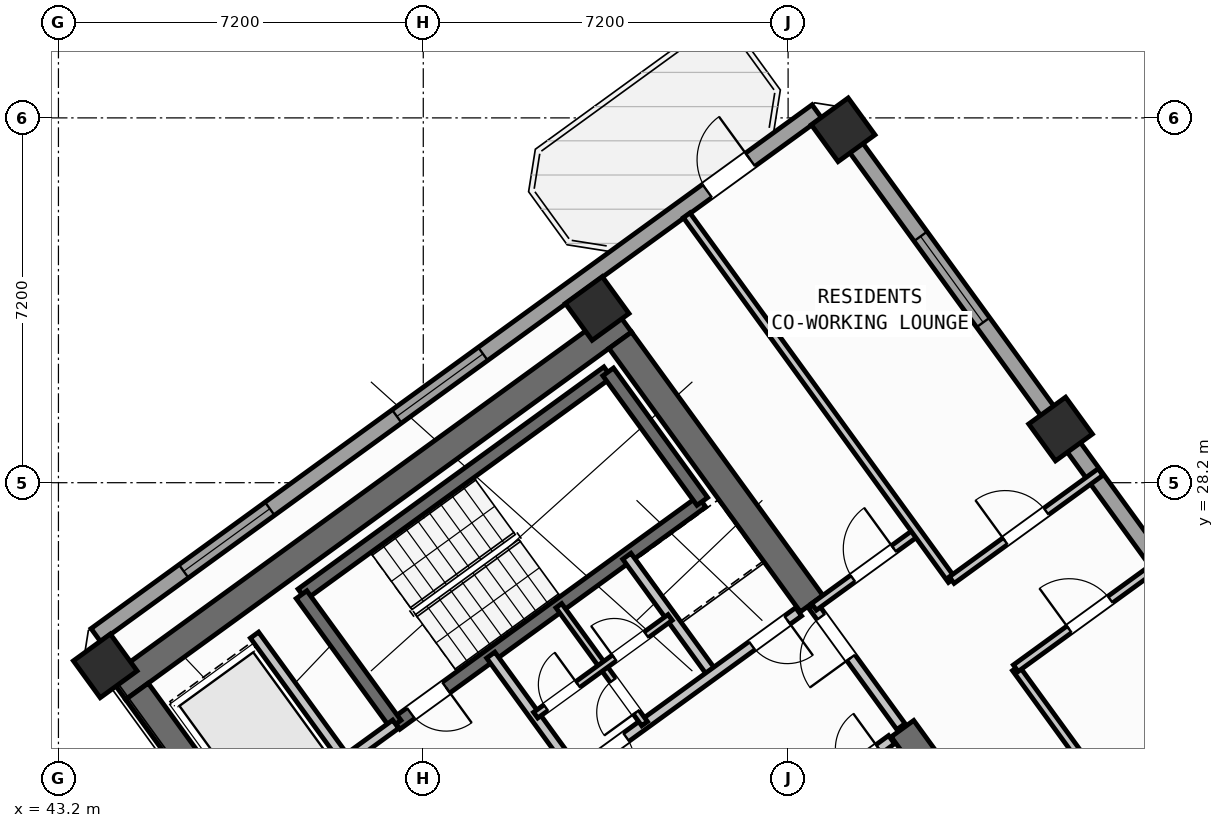
"""IFC4 building model, lengths in metres.
Left out: names, types, materials, properties, quantities, classifications, styles, units other than length and angle.
Written with IfcOpenShell. Run it as: python <this file> out.ifc"""

import sys

from ifc_helpers import new_model, si_unit, direction, frame, frame_2d, origin, origin_2d, place, context, subcontext, project, spatial, rectangle, hollow_rectangle, extrude, source, transform, mapped, element, fill, save


model = new_model("IFC4")
c1 = context("Model", 3, precision=1e-05, world=origin(), true_north=direction((0.0, 1.0)))
c2 = subcontext(c1, "Body", "Model", "MODEL_VIEW")
j1 = project(units=[si_unit("LENGTHUNIT", "METRE"), si_unit("PLANEANGLEUNIT", "RADIAN")], contexts=[c1])
p1 = place(None, origin())
s1 = spatial("IfcSite", under=j1, at=p1, CompositionType="ELEMENT")
p2 = place(p1, origin())
s2 = spatial("IfcBuilding", under=s1, at=p2, CompositionType="ELEMENT")
p3 = place(p2, frame((0.0, 0.0, 140.7)))
s3 = spatial("IfcBuildingStorey", under=s2, at=p3, CompositionType="ELEMENT", Elevation=140.7)
p4 = place(p3, frame((44.365, 24.142, 0.0), z_axis=(0.0, 0.0, 1.0), x_axis=(0.809024304885, 0.587775190107, 0.0)))
e1 = element("IfcWall", 1, at=p4, inside=s3, PredefinedType="SHEAR", context=c2, shape_type="SweptSolid", body=[
    extrude(rectangle(XDim=12.34, YDim=0.55, at=frame_2d((6.17, 0.0))), origin(), (0.0, 0.0, 1.0), 3.35),
])
p5 = place(p3, frame((48.526, 18.884, 0.0), z_axis=(0.0, 0.0, 1.0), x_axis=(-0.587764933797, 0.809031756236, 0.0)))
e2 = element("IfcWall", 2, at=p5, inside=s3, PredefinedType="SHEAR", context=c2, shape_type="SweptSolid", body=[
    extrude(rectangle(XDim=6.425, YDim=0.55, at=frame_2d((3.212, 0.0))), origin(), (0.0, 0.0, 1.0), 3.35),
])
p6 = place(p3, frame((61.958, 20.454, 0.0), z_axis=(0.0, 0.0, 1.0), x_axis=(-0.587802113096, 0.809004744015, 0.0)))
e3 = element("IfcWall", 3, at=p6, inside=s3, PredefinedType="SHEAR", context=c2, shape_type="SweptSolid", body=[
    extrude(rectangle(XDim=3.575, YDim=0.55, at=frame_2d((1.788, 0.0))), origin(), (0.0, 0.0, 1.0), 3.35),
])
p7 = place(p3, frame((58.064, 25.813, 0.0), z_axis=(0.0, 0.0, 1.0), x_axis=(-0.587764933797, 0.809031756236, 0.0)))
e4 = element("IfcWall", 4, at=p7, inside=s3, PredefinedType="SHEAR", context=c2, shape_type="SweptSolid", body=[
    extrude(rectangle(XDim=6.425, YDim=0.55, at=frame_2d((3.212, 0.0))), origin(), (0.0, 0.0, 1.0), 3.35),
])
m1 = source(origin(), c2, "Body", "SweptSolid", [
    extrude(hollow_rectangle(XDim=0.9, YDim=0.9, WallThickness=0.036, at=origin_2d()), origin(), (0.0, 0.0, 1.0), 3.6),
])
for number, where, z_axis, x_axis in (
    (5, (44.124, 24.585, 0.0), (0.0, 0.0, 1.0), (0.809, 0.588, 0.0)),
    (6, (53.832, 31.638, 0.0), (0.0, 0.0, 1.0), (0.809, 0.588, 0.0)),
    (7, (62.977, 29.259, 0.0), (0.0, 0.0, 1.0), (0.809, 0.588, 0.0)),
    (8, (58.686, 35.165, 0.0), (0.0, 0.0, 1.0), (0.809, 0.588, 0.0)),
):
    element("IfcColumn", number, at=place(p3, frame(where, z_axis=z_axis, x_axis=x_axis)), inside=s3, PredefinedType="COLUMN", context=c2, shape_type="MappedRepresentation", body=[
        mapped(m1, transform((0.0, 0.0, 0.0), scale=1.0)),
    ])
p8 = place(p3, frame((43.938, 25.192, 0.0), z_axis=(0.0, 0.0, 1.0), x_axis=(0.809016324578, 0.587786174187, 0.0)))
e9 = element("IfcWall", 9, at=p8, inside=s3, PredefinedType="STANDARD", context=c2, shape_type="SweptSolid", body=[
    extrude(rectangle(XDim=17.587, YDim=0.32, at=frame_2d((8.794, 0.0))), origin(), (0.0, 0.0, 1.0), 3.35),
])
p9 = place(p8, frame((14.914, 0.0, 0.0)))
e10 = element("IfcOpeningElement", 10, at=p9, cuts=e9, PredefinedType="OPENING", context=c2, shape_type="SweptSolid", body=[
    extrude(rectangle(XDim=1.05, YDim=2.15, at=frame_2d((0.525, 1.075))), frame((0.0, 0.17, 0.0), z_axis=(0.0, -1.0, 0.0), x_axis=(1.0, 0.0, 0.0)), (0.0, 0.0, 1.0), 0.34),
])
p10 = place(p8, frame((2.144, 0.0, 0.8)))
e11 = element("IfcOpeningElement", 11, at=p10, cuts=e9, PredefinedType="OPENING", context=c2, shape_type="SweptSolid", body=[
    extrude(rectangle(XDim=2.1, YDim=1.55, at=frame_2d((1.05, 0.775))), frame((0.0, 0.17, 0.0), z_axis=(0.0, -1.0, 0.0), x_axis=(1.0, 0.0, 0.0)), (0.0, 0.0, 1.0), 0.34),
])
p11 = place(p8, frame((7.344, 0.0, 0.8)))
e12 = element("IfcOpeningElement", 12, at=p11, cuts=e9, PredefinedType="OPENING", context=c2, shape_type="SweptSolid", body=[
    extrude(rectangle(XDim=2.1, YDim=1.55, at=frame_2d((1.05, 0.775))), frame((0.0, 0.17, 0.0), z_axis=(0.0, -1.0, 0.0), x_axis=(1.0, 0.0, 0.0)), (0.0, 0.0, 1.0), 0.34),
])
p12 = place(p3, frame((58.455, 35.484, 0.0), z_axis=(0.0, 0.0, 1.0), x_axis=(0.587783625747, -0.809018176127, 0.0)))
e13 = element("IfcWall", 13, at=p12, inside=s3, PredefinedType="STANDARD", context=c2, shape_type="SweptSolid", body=[
    extrude(rectangle(XDim=21.587, YDim=0.32, at=frame_2d((10.794, 0.0))), origin(), (0.0, 0.0, 1.0), 2.775),
])
p13 = place(p12, frame((2.994, 0.0, 0.8)))
e14 = element("IfcOpeningElement", 14, at=p13, cuts=e13, PredefinedType="OPENING", context=c2, shape_type="SweptSolid", body=[
    extrude(rectangle(XDim=2.1, YDim=1.55, at=frame_2d((1.05, 0.775))), frame((0.0, 0.17, 0.0), z_axis=(0.0, -1.0, 0.0), x_axis=(1.0, 0.0, 0.0)), (0.0, 0.0, 1.0), 0.34),
])
p14 = place(p12, frame((11.959, 0.0, 0.85)))
e15 = element("IfcOpeningElement", 15, at=p14, cuts=e13, PredefinedType="OPENING", context=c2, shape_type="SweptSolid", body=[
    extrude(rectangle(XDim=1.8, YDim=1.5, at=frame_2d((0.9, 0.75))), frame((0.0, 0.17, 0.0), z_axis=(0.0, -1.0, 0.0), x_axis=(1.0, 0.0, 0.0)), (0.0, 0.0, 1.0), 0.34),
])
p15 = place(p12, frame((18.56, 0.0, 0.85)))
e16 = element("IfcOpeningElement", 16, at=p15, cuts=e13, PredefinedType="OPENING", context=c2, shape_type="SweptSolid", body=[
    extrude(rectangle(XDim=1.5, YDim=1.5, at=frame_2d((0.75, 0.75))), frame((0.0, 0.17, 0.0), z_axis=(0.0, -1.0, 0.0), x_axis=(1.0, 0.0, 0.0)), (0.0, 0.0, 1.0), 0.34),
])
p16 = place(p3, frame((48.006, 25.996, 0.0), z_axis=(0.0, 0.0, 1.0), x_axis=(0.80901903764, 0.587782439969, 0.0)))
e17 = element("IfcWall", 17, at=p16, inside=s3, PredefinedType="SHEAR", context=c2, shape_type="SweptSolid", body=[
    extrude(rectangle(XDim=7.46, YDim=0.26, at=frame_2d((3.73, 0.0))), origin(), (0.0, 0.0, 1.0), 3.35),
])
p17 = place(p3, frame((49.863, 23.44, 0.0), z_axis=(0.0, 0.0, 1.0), x_axis=(0.809003474932, 0.587803859759, 0.0)))
e18 = element("IfcWall", 18, at=p17, inside=s3, PredefinedType="SHEAR", context=c2, shape_type="SweptSolid", body=[
    extrude(rectangle(XDim=7.46, YDim=0.26, at=frame_2d((3.73, 0.0))), origin(), (0.0, 0.0, 1.0), 3.35),
])
p18 = place(p17, frame((0.36, 0.0, 0.0)))
e19 = element("IfcOpeningElement", 19, at=p18, cuts=e18, PredefinedType="OPENING", context=c2, shape_type="SweptSolid", body=[
    extrude(rectangle(XDim=0.86, YDim=2.05, at=frame_2d((0.43, 1.025))), frame((0.0, 0.14, 0.0), z_axis=(0.0, -1.0, 0.0), x_axis=(1.0, 0.0, 0.0)), (0.0, 0.0, 1.0), 0.28),
])
p19 = place(p3, frame((49.855, 23.434, 0.0), z_axis=(0.0, 0.0, 1.0), x_axis=(-0.58776738483, 0.809029975545, 0.0)))
e20 = element("IfcWall", 20, at=p19, inside=s3, PredefinedType="SHEAR", context=c2, shape_type="SweptSolid", body=[
    extrude(rectangle(XDim=3.16, YDim=0.26, at=frame_2d((1.58, 0.0))), origin(), (0.0, 0.0, 1.0), 3.35),
])
p20 = place(p3, frame((55.906, 27.831, 0.0), z_axis=(0.0, 0.0, 1.0), x_axis=(-0.587804123638, 0.809003283204, 0.0)))
e21 = element("IfcWall", 21, at=p20, inside=s3, PredefinedType="SHEAR", context=c2, shape_type="SweptSolid", body=[
    extrude(rectangle(XDim=3.16, YDim=0.26, at=frame_2d((1.58, 0.0))), origin(), (0.0, 0.0, 1.0), 3.35),
])
p21 = place(p3, frame((47.065, 21.407, 0.0), z_axis=(0.0, 0.0, 1.0), x_axis=(0.809032984992, 0.587763242466, 0.0)))
e22 = element("IfcWall", 22, at=p21, inside=s3, PredefinedType="STANDARD", context=c2, shape_type="SweptSolid", body=[
    extrude(rectangle(XDim=3.448, YDim=0.2, at=frame_2d((1.724, 0.0))), origin(), (0.0, 0.0, 1.0), 3.34),
])
p22 = place(p21, frame((0.458, 0.0, 0.0)))
e23 = element("IfcOpeningElement", 23, at=p22, cuts=e22, PredefinedType="OPENING", context=c2, shape_type="SweptSolid", body=[
    extrude(rectangle(XDim=1.3, YDim=2.2, at=frame_2d((0.65, 1.1))), frame((0.0, 0.11, 0.0), z_axis=(0.0, -1.0, 0.0), x_axis=(1.0, 0.0, 0.0)), (0.0, 0.0, 1.0), 0.22),
])
p23 = place(p3, frame((56.553, 20.884, 0.0), z_axis=(0.0, 0.0, 1.0), x_axis=(0.809023564264, 0.58777620951, 0.0)))
e24 = element("IfcWall", 24, at=p23, inside=s3, PredefinedType="STANDARD", context=c2, shape_type="SweptSolid", body=[
    extrude(rectangle(XDim=3.818, YDim=0.2, at=frame_2d((1.909, 0.0))), origin(), (0.0, 0.0, 1.0), 3.34),
])
p24 = place(p23, frame((0.57, 0.0, 0.0)))
e25 = element("IfcOpeningElement", 25, at=p24, cuts=e24, PredefinedType="OPENING", context=c2, shape_type="SweptSolid", body=[
    extrude(rectangle(XDim=1.1, YDim=2.15, at=frame_2d((0.55, 1.075))), frame((0.0, 0.11, 0.0), z_axis=(0.0, -1.0, 0.0), x_axis=(1.0, 0.0, 0.0)), (0.0, 0.0, 1.0), 0.22),
])
p25 = place(p23, frame((2.65, 0.0, 0.0)))
e26 = element("IfcOpeningElement", 26, at=p25, cuts=e24, PredefinedType="OPENING", context=c2, shape_type="SweptSolid", body=[
    extrude(rectangle(XDim=0.86, YDim=2.05, at=frame_2d((0.43, 1.025))), frame((0.0, 0.11, 0.0), z_axis=(0.0, -1.0, 0.0), x_axis=(1.0, 0.0, 0.0)), (0.0, 0.0, 1.0), 0.22),
])
p26 = place(p3, frame((48.786, 22.83, 0.0), z_axis=(0.0, 0.0, 1.0), x_axis=(-0.587783856777, 0.809018008275, 0.0)))
e27 = element("IfcWall", 27, at=p26, inside=s3, PredefinedType="STANDARD", context=c2, shape_type="SweptSolid", body=[
    extrude(rectangle(XDim=2.92, YDim=0.2, at=frame_2d((1.46, 0.0))), origin(), (0.0, 0.0, 1.0), 3.34),
])
p27 = place(p3, frame((53.425, 22.468, 0.0), z_axis=(0.0, 0.0, 1.0), x_axis=(-0.5877230039, 0.809062216821, 0.0)))
e28 = element("IfcWall", 28, at=p27, inside=s3, PredefinedType="STANDARD", context=c2, shape_type="SweptSolid", body=[
    extrude(rectangle(XDim=2.88, YDim=0.2, at=frame_2d((1.44, 0.0))), origin(), (0.0, 0.0, 1.0), 3.34),
])
p28 = place(p3, frame((56.111, 24.419, 0.0), z_axis=(0.0, 0.0, 1.0), x_axis=(-0.58777848983, 0.809021907548, 0.0)))
e29 = element("IfcWall", 29, at=p28, inside=s3, PredefinedType="STANDARD", context=c2, shape_type="SweptSolid", body=[
    extrude(rectangle(XDim=2.88, YDim=0.2, at=frame_2d((1.44, 0.0))), origin(), (0.0, 0.0, 1.0), 3.34),
])
p29 = place(p3, frame((53.425, 22.468, 0.0), z_axis=(0.0, 0.0, 1.0), x_axis=(0.809024377198, 0.587775090574, 0.0)))
e30 = element("IfcWall", 30, at=p29, inside=s3, PredefinedType="STANDARD", context=c2, shape_type="SweptSolid", body=[
    extrude(rectangle(XDim=5.418, YDim=0.2, at=frame_2d((2.709, 0.0))), origin(), (0.0, 0.0, 1.0), 3.34),
])
p30 = place(p29, frame((4.28, 0.0, 0.0)))
e31 = element("IfcOpeningElement", 31, at=p30, cuts=e30, PredefinedType="OPENING", context=c2, shape_type="SweptSolid", body=[
    extrude(rectangle(XDim=0.86, YDim=2.05, at=frame_2d((0.43, 1.025))), frame((0.0, 0.11, 0.0), z_axis=(0.0, -1.0, 0.0), x_axis=(1.0, 0.0, 0.0)), (0.0, 0.0, 1.0), 0.22),
])
p31 = place(p29, frame((0.35, 0.0, 0.0)))
e32 = element("IfcOpeningElement", 32, at=p31, cuts=e30, PredefinedType="OPENING", context=c2, shape_type="SweptSolid", body=[
    extrude(rectangle(XDim=0.86, YDim=2.05, at=frame_2d((0.43, 1.025))), frame((0.0, 0.11, 0.0), z_axis=(0.0, -1.0, 0.0), x_axis=(1.0, 0.0, 0.0)), (0.0, 0.0, 1.0), 0.22),
])
p32 = place(p3, frame((54.768, 23.443, 0.0), z_axis=(0.0, 0.0, 1.0), x_axis=(-0.587736077749, 0.809052719489, 0.0)))
e33 = element("IfcWall", 33, at=p32, inside=s3, PredefinedType="PLUMBINGWALL", context=c2, shape_type="SweptSolid", body=[
    extrude(rectangle(XDim=1.4, YDim=0.14, at=frame_2d((0.7, 0.0))), origin(), (0.0, 0.0, 1.0), 3.34),
])
p33 = place(p32, frame((0.28, 0.0, 0.0)))
e34 = element("IfcOpeningElement", 34, at=p33, cuts=e33, PredefinedType="OPENING", context=c2, shape_type="SweptSolid", body=[
    extrude(rectangle(XDim=0.78, YDim=2.05, at=frame_2d((0.39, 1.025))), frame((0.0, 0.08, 0.0), z_axis=(0.0, -1.0, 0.0), x_axis=(1.0, 0.0, 0.0)), (0.0, 0.0, 1.0), 0.16),
])
p34 = place(p3, frame((53.945, 24.576, 0.0), z_axis=(0.0, 0.0, 1.0), x_axis=(-0.587897037186, 0.808935766095, 0.0)))
e35 = element("IfcWall", 35, at=p34, inside=s3, PredefinedType="PLUMBINGWALL", context=c2, shape_type="SweptSolid", body=[
    extrude(rectangle(XDim=1.48, YDim=0.14, at=frame_2d((0.74, 0.0))), origin(), (0.0, 0.0, 1.0), 3.34),
])
p35 = place(p3, frame((52.618, 23.612, 0.0), z_axis=(0.0, 0.0, 1.0), x_axis=(0.809009587469, 0.587795446889, 0.0)))
e36 = element("IfcWall", 36, at=p35, inside=s3, PredefinedType="PLUMBINGWALL", context=c2, shape_type="SweptSolid", body=[
    extrude(rectangle(XDim=3.28, YDim=0.14, at=frame_2d((1.64, 0.0))), origin(), (0.0, 0.0, 1.0), 3.34),
])
p36 = place(p35, frame((0.25, 0.0, 0.0)))
e37 = element("IfcOpeningElement", 37, at=p36, cuts=e36, PredefinedType="OPENING", context=c2, shape_type="SweptSolid", body=[
    extrude(rectangle(XDim=0.78, YDim=2.05, at=frame_2d((0.39, 1.025))), frame((0.0, 0.08, 0.0), z_axis=(0.0, -1.0, 0.0), x_axis=(1.0, 0.0, 0.0)), (0.0, 0.0, 1.0), 0.16),
])
p37 = place(p35, frame((1.92, 0.0, 0.0)))
e38 = element("IfcOpeningElement", 38, at=p37, cuts=e36, PredefinedType="OPENING", context=c2, shape_type="SweptSolid", body=[
    extrude(rectangle(XDim=0.78, YDim=2.05, at=frame_2d((0.39, 1.025))), frame((0.0, 0.08, 0.0), z_axis=(0.0, -1.0, 0.0), x_axis=(1.0, 0.0, 0.0)), (0.0, 0.0, 1.0), 0.16),
])
p38 = place(p3, frame((59.827, 23.386, 0.0), z_axis=(0.0, 0.0, 1.0), x_axis=(-0.587803840107, 0.809003489211, 0.0)))
e39 = element("IfcWall", 39, at=p38, inside=s3, PredefinedType="STANDARD", context=c2, shape_type="SweptSolid", body=[
    extrude(rectangle(XDim=2.96, YDim=0.2, at=frame_2d((1.48, 0.0))), origin(), (0.0, 0.0, 1.0), 3.34),
])
p39 = place(p38, frame((1.68, 0.0, 0.0)))
e40 = element("IfcOpeningElement", 40, at=p39, cuts=e39, PredefinedType="OPENING", context=c2, shape_type="SweptSolid", body=[
    extrude(rectangle(XDim=1.0, YDim=2.1, at=frame_2d((0.5, 1.05))), frame((0.0, 0.11, 0.0), z_axis=(0.0, -1.0, 0.0), x_axis=(1.0, 0.0, 0.0)), (0.0, 0.0, 1.0), 0.22),
])
p40 = place(p3, frame((58.111, 25.749, 0.0), z_axis=(0.0, 0.0, 1.0), x_axis=(0.809000999347, 0.58780726693, 0.0)))
e41 = element("IfcWall", 41, at=p40, inside=s3, PredefinedType="PARTITIONING", context=c2, shape_type="SweptSolid", body=[
    extrude(rectangle(XDim=2.51, YDim=0.16, at=frame_2d((1.255, 0.0))), origin(), (0.0, 0.0, 1.0), 2.775),
])
p41 = place(p40, frame((0.95, 0.0, 0.0)))
e42 = element("IfcOpeningElement", 42, at=p41, cuts=e41, PredefinedType="OPENING", context=c2, shape_type="SweptSolid", body=[
    extrude(rectangle(XDim=1.0, YDim=2.1, at=frame_2d((0.5, 1.05))), frame((0.0, 0.09, 0.0), z_axis=(0.0, -1.0, 0.0), x_axis=(1.0, 0.0, 0.0)), (0.0, 0.0, 1.0), 0.18),
])
p42 = place(p3, frame((68.353, 15.922, 0.0), z_axis=(0.0, 0.0, 1.0), x_axis=(-0.587783168305, 0.809018508476, 0.0)))
e43 = element("IfcWall", 43, at=p42, inside=s3, PredefinedType="PARTITIONING", context=c2, shape_type="SweptSolid", body=[
    extrude(rectangle(XDim=10.65, YDim=0.16, at=frame_2d((5.325, 0.0))), origin(), (0.0, 0.0, 1.0), 3.34),
])
p43 = place(p3, frame((60.829, 26.278, 0.0), z_axis=(0.0, 0.0, 1.0), x_axis=(-0.587781800813, 0.80901950201, 0.0)))
e44 = element("IfcWall", 44, at=p43, inside=s3, PredefinedType="PARTITIONING", context=c2, shape_type="SweptSolid", body=[
    extrude(rectangle(XDim=8.9, YDim=0.16, at=frame_2d((4.45, 0.0))), origin(), (0.0, 0.0, 1.0), 3.34),
])
p44 = place(p3, frame((62.093, 24.538, 0.0), z_axis=(0.0, 0.0, 1.0), x_axis=(0.809035546126, 0.58775971715, 0.0)))
e45 = element("IfcWall", 45, at=p44, inside=s3, PredefinedType="PARTITIONING", context=c2, shape_type="SweptSolid", body=[
    extrude(rectangle(XDim=3.63, YDim=0.16, at=frame_2d((1.815, 0.0))), origin(), (0.0, 0.0, 1.0), 3.34),
])
p45 = place(p44, frame((1.305, 0.0, 0.0)))
e46 = element("IfcOpeningElement", 46, at=p45, cuts=e45, PredefinedType="OPENING", context=c2, shape_type="SweptSolid", body=[
    extrude(rectangle(XDim=1.0, YDim=2.1, at=frame_2d((0.5, 1.05))), frame((0.0, 0.09, 0.0), z_axis=(0.0, -1.0, 0.0), x_axis=(1.0, 0.0, 0.0)), (0.0, 0.0, 1.0), 0.18),
])
p46 = place(p3, frame((60.829, 26.278, 0.0), z_axis=(0.0, 0.0, 1.0), x_axis=(0.809003564202, 0.587803736896, 0.0)))
e47 = element("IfcWall", 47, at=p46, inside=s3, PredefinedType="PARTITIONING", context=c2, shape_type="SweptSolid", body=[
    extrude(rectangle(XDim=3.63, YDim=0.16, at=frame_2d((1.815, 0.0))), origin(), (0.0, 0.0, 1.0), 3.34),
])
p47 = place(p46, frame((1.305, 0.0, 0.0)))
e48 = element("IfcOpeningElement", 48, at=p47, cuts=e47, PredefinedType="OPENING", context=c2, shape_type="SweptSolid", body=[
    extrude(rectangle(XDim=1.0, YDim=2.1, at=frame_2d((0.5, 1.05))), frame((0.0, 0.09, 0.0), z_axis=(0.0, -1.0, 0.0), x_axis=(1.0, 0.0, 0.0)), (0.0, 0.0, 1.0), 0.18),
])
m2 = source(origin(), c2, "Body", "SweptSolid", [
    extrude(rectangle(XDim=1.05, YDim=2.15, at=frame_2d((0.525, 1.075))), frame((0.0, 0.025, 0.0), z_axis=(0.0, -1.0, 0.0), x_axis=(1.0, 0.0, 0.0)), (0.0, 0.0, 1.0), 0.05),
])
p48 = place(p9, origin())
e49 = element("IfcDoor", 49, at=p48, inside=s3, OperationType="SINGLE_SWING_RIGHT", PredefinedType="DOOR", context=c2, shape_type="MappedRepresentation", body=[
    mapped(m2, transform((0.0, 0.0, 0.0), scale=1.0)),
])
fill(e10, e49)
m3 = source(origin(), c2, "Body", "SweptSolid", [
    extrude(rectangle(XDim=2.1, YDim=1.55, at=frame_2d((1.05, 0.775))), frame((0.0, 0.03, 0.0), z_axis=(0.0, -1.0, 0.0), x_axis=(1.0, 0.0, 0.0)), (0.0, 0.0, 1.0), 0.06),
])
p49 = place(p10, origin())
e50 = element("IfcWindow", 50, at=p49, inside=s3, PartitioningType="SINGLE_PANEL", PredefinedType="WINDOW", context=c2, shape_type="MappedRepresentation", body=[
    mapped(m3, transform((0.0, 0.0, 0.0), scale=1.0)),
])
fill(e11, e50)
p50 = place(p11, origin())
e51 = element("IfcWindow", 51, at=p50, inside=s3, PartitioningType="SINGLE_PANEL", PredefinedType="WINDOW", context=c2, shape_type="MappedRepresentation", body=[
    mapped(m3, transform((0.0, 0.0, 0.0), scale=1.0)),
])
fill(e12, e51)
p51 = place(p13, origin())
e52 = element("IfcWindow", 52, at=p51, inside=s3, PartitioningType="SINGLE_PANEL", PredefinedType="WINDOW", context=c2, shape_type="MappedRepresentation", body=[
    mapped(m3, transform((0.0, 0.0, 0.0), scale=1.0)),
])
fill(e14, e52)
m4 = source(origin(), c2, "Body", "SweptSolid", [
    extrude(rectangle(XDim=0.86, YDim=2.05, at=frame_2d((0.43, 1.025))), frame((0.0, 0.025, 0.0), z_axis=(0.0, -1.0, 0.0), x_axis=(1.0, 0.0, 0.0)), (0.0, 0.0, 1.0), 0.05),
])
p52 = place(p18, frame((0.86, 0.0, 0.0), z_axis=(0.0, 0.0, 1.0), x_axis=(-1.0, 0.0, 0.0)))
e53 = element("IfcDoor", 53, at=p52, inside=s3, OperationType="SINGLE_SWING_LEFT", PredefinedType="DOOR", context=c2, shape_type="MappedRepresentation", body=[
    mapped(m4, transform((0.0, 0.0, 0.0), scale=1.0)),
])
fill(e19, e53)
p53 = place(p30, frame((0.86, 0.0, 0.0), z_axis=(0.0, 0.0, 1.0), x_axis=(-1.0, 0.0, 0.0)))
e54 = element("IfcDoor", 54, at=p53, inside=s3, OperationType="SINGLE_SWING_LEFT", PredefinedType="DOOR", context=c2, shape_type="MappedRepresentation", body=[
    mapped(m4, transform((0.0, 0.0, 0.0), scale=1.0)),
])
fill(e31, e54)
p54 = place(p31, frame((0.86, 0.0, 0.0), z_axis=(0.0, 0.0, 1.0), x_axis=(-1.0, 0.0, 0.0)))
e55 = element("IfcDoor", 55, at=p54, inside=s3, OperationType="SINGLE_SWING_RIGHT", PredefinedType="DOOR", context=c2, shape_type="MappedRepresentation", body=[
    mapped(m4, transform((0.0, 0.0, 0.0), scale=1.0)),
])
fill(e32, e55)
m5 = source(origin(), c2, "Body", "SweptSolid", [
    extrude(rectangle(XDim=0.78, YDim=2.05, at=frame_2d((0.39, 1.025))), frame((0.0, 0.025, 0.0), z_axis=(0.0, -1.0, 0.0), x_axis=(1.0, 0.0, 0.0)), (0.0, 0.0, 1.0), 0.05),
])
p55 = place(p33, origin())
e56 = element("IfcDoor", 56, at=p55, inside=s3, OperationType="SINGLE_SWING_LEFT", PredefinedType="DOOR", context=c2, shape_type="MappedRepresentation", body=[
    mapped(m5, transform((0.0, 0.0, 0.0), scale=1.0)),
])
fill(e34, e56)
p56 = place(p36, origin())
e57 = element("IfcDoor", 57, at=p56, inside=s3, OperationType="SINGLE_SWING_RIGHT", PredefinedType="DOOR", context=c2, shape_type="MappedRepresentation", body=[
    mapped(m5, transform((0.0, 0.0, 0.0), scale=1.0)),
])
fill(e37, e57)
p57 = place(p37, origin())
e58 = element("IfcDoor", 58, at=p57, inside=s3, OperationType="SINGLE_SWING_LEFT", PredefinedType="DOOR", context=c2, shape_type="MappedRepresentation", body=[
    mapped(m5, transform((0.0, 0.0, 0.0), scale=1.0)),
])
fill(e38, e58)
m6 = source(origin(), c2, "Body", "SweptSolid", [
    extrude(rectangle(XDim=1.0, YDim=2.1, at=frame_2d((0.5, 1.05))), frame((0.0, 0.025, 0.0), z_axis=(0.0, -1.0, 0.0), x_axis=(1.0, 0.0, 0.0)), (0.0, 0.0, 1.0), 0.05),
])
p58 = place(p41, origin())
e59 = element("IfcDoor", 59, at=p58, inside=s3, OperationType="SINGLE_SWING_RIGHT", PredefinedType="DOOR", context=c2, shape_type="MappedRepresentation", body=[
    mapped(m6, transform((0.0, 0.0, 0.0), scale=1.0)),
])
fill(e42, e59)
p59 = place(p39, origin())
e60 = element("IfcDoor", 60, at=p59, inside=s3, OperationType="SINGLE_SWING_LEFT", PredefinedType="DOOR", context=c2, shape_type="MappedRepresentation", body=[
    mapped(m6, transform((0.0, 0.0, 0.0), scale=1.0)),
])
fill(e40, e60)
p60 = place(p47, origin())
e61 = element("IfcDoor", 61, at=p60, inside=s3, OperationType="SINGLE_SWING_LEFT", PredefinedType="DOOR", context=c2, shape_type="MappedRepresentation", body=[
    mapped(m6, transform((0.0, 0.0, 0.0), scale=1.0)),
])
fill(e48, e61)
p61 = place(p45, origin())
e62 = element("IfcDoor", 62, at=p61, inside=s3, OperationType="SINGLE_SWING_LEFT", PredefinedType="DOOR", context=c2, shape_type="MappedRepresentation", body=[
    mapped(m6, transform((0.0, 0.0, 0.0), scale=1.0)),
])
fill(e46, e62)
save(model, sys.argv[1])
